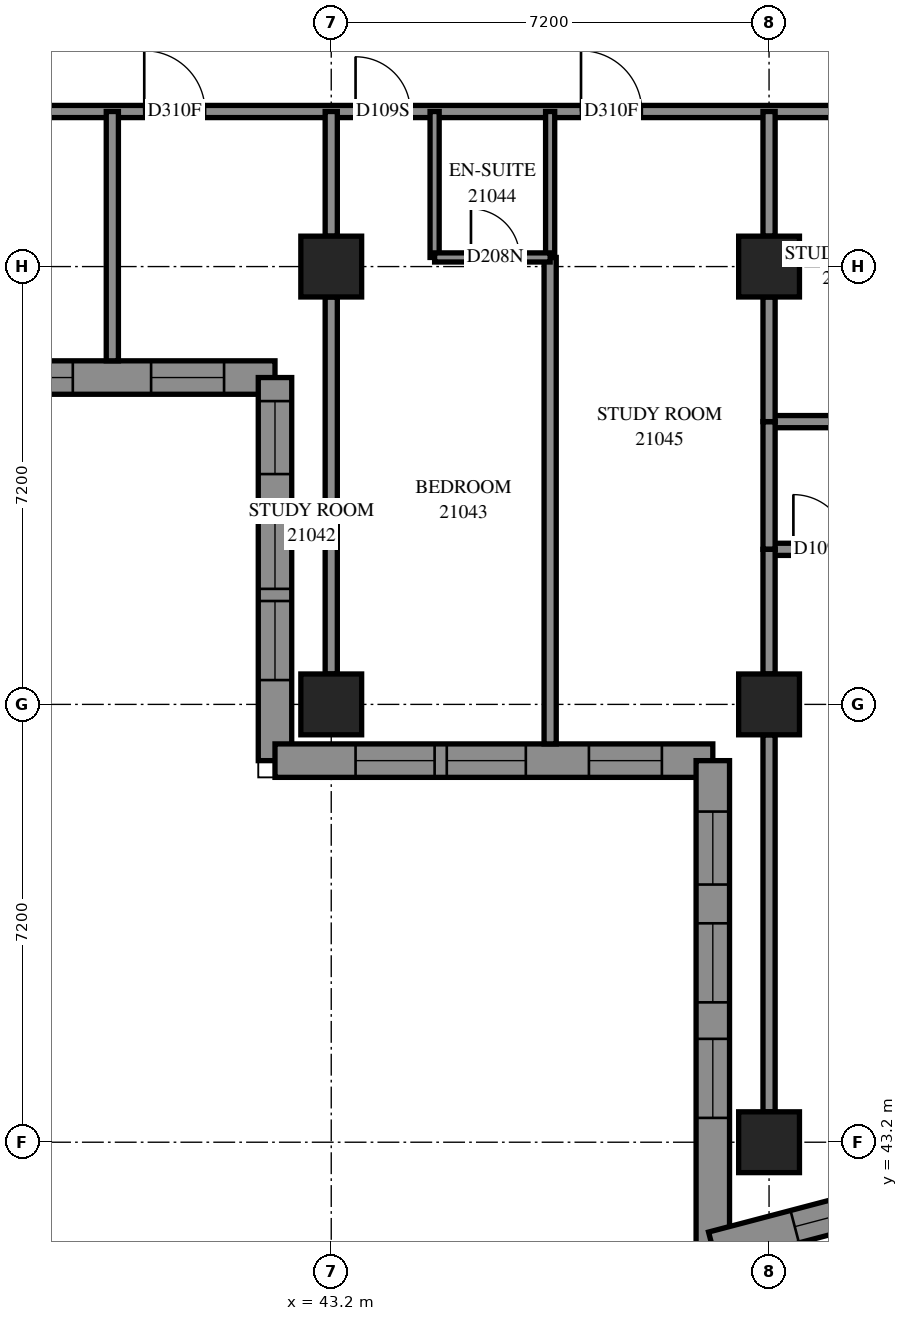
"""IFC4 building model, lengths in metres.
Left out: names, types, materials, properties, quantities, classifications, styles, units other than length and angle.
Written with IfcOpenShell. Run it as: python <this file> out.ifc"""

import sys

from ifc_helpers import new_model, si_unit, direction, frame, frame_2d, origin, origin_2d, place, context, subcontext, project, spatial, polyline, rectangle, outline, extrude, element, fill, save


model = new_model("IFC4")
c1 = context("Model", 3, precision=1e-05, world=origin(), true_north=direction((0.0, 1.0)))
c2 = subcontext(c1, "Body", "Model", "MODEL_VIEW")
j1 = project(units=[si_unit("LENGTHUNIT", "METRE"), si_unit("PLANEANGLEUNIT", "RADIAN")], contexts=[c1])
p1 = place(None, origin())
s1 = spatial("IfcSite", under=j1, at=p1, CompositionType="ELEMENT")
p2 = place(p1, origin())
s2 = spatial("IfcBuilding", under=s1, at=p2, CompositionType="ELEMENT")
p3 = place(p2, frame((0.0, 0.0, 81.2)))
s3 = spatial("IfcBuildingStorey", under=s2, at=p3, CompositionType="ELEMENT", Elevation=81.2)
for number, where, z_axis, x_axis in (
    (1, (43.2, 50.4, 0.0), (0.0, 0.0, 1.0), (1.0, 0.0, 0.0)),
    (2, (43.2, 57.6, 0.0), (0.0, 0.0, 1.0), (1.0, 0.0, 0.0)),
    (3, (50.4, 43.2, 0.0), (0.0, 0.0, 1.0), (1.0, 0.0, 0.0)),
    (4, (50.4, 50.4, 0.0), (0.0, 0.0, 1.0), (1.0, 0.0, 0.0)),
    (5, (50.4, 57.6, 0.0), (0.0, 0.0, 1.0), (1.0, 0.0, 0.0)),
):
    element("IfcColumn", number, at=place(p3, frame(where, z_axis=z_axis, x_axis=x_axis)), inside=s3, PredefinedType="COLUMN", context=c2, shape_type="SweptSolid", body=[
        extrude(rectangle(XDim=1.0, YDim=1.0, at=origin_2d()), origin(), (0.0, 0.0, 1.0), 3.1),
    ])
p4 = place(p3, frame((27.875, 55.775, 0.0), z_axis=(0.0, 0.0, 1.0), x_axis=(1.0, 0.0, 0.0)))
e6 = element("IfcWall", 6, at=p4, inside=s3, PredefinedType="SOLIDWALL", context=c2, shape_type="SweptSolid", body=[
    extrude(outline(polyline([(-0.275, -0.275), (14.125, -0.275), (14.675, 0.275), (0.275, 0.275), (-0.275, -0.275)])), origin(), (0.0, 0.0, 1.0), 3.1),
])
p5 = place(p4, frame((1.175, 0.0, 0.5)))
e7 = element("IfcOpeningElement", 7, at=p5, cuts=e6, PredefinedType="OPENING", context=c2, shape_type="SweptSolid", body=[
    extrude(rectangle(XDim=1.3, YDim=2.45, at=frame_2d((0.65, 1.225))), frame((0.0, 0.285, 0.0), z_axis=(0.0, -1.0, 0.0), x_axis=(1.0, 0.0, 0.0)), (0.0, 0.0, 1.0), 0.57),
])
p6 = place(p4, frame((2.675, 0.0, 0.5)))
e8 = element("IfcOpeningElement", 8, at=p6, cuts=e6, PredefinedType="OPENING", context=c2, shape_type="SweptSolid", body=[
    extrude(rectangle(XDim=1.3, YDim=2.45, at=frame_2d((0.65, 1.225))), frame((0.0, 0.285, 0.0), z_axis=(0.0, -1.0, 0.0), x_axis=(1.0, 0.0, 0.0)), (0.0, 0.0, 1.0), 0.57),
])
p7 = place(p4, frame((4.925, 0.0, 0.5)))
e9 = element("IfcOpeningElement", 9, at=p7, cuts=e6, PredefinedType="OPENING", context=c2, shape_type="SweptSolid", body=[
    extrude(rectangle(XDim=1.3, YDim=2.45, at=frame_2d((0.65, 1.225))), frame((0.0, 0.285, 0.0), z_axis=(0.0, -1.0, 0.0), x_axis=(1.0, 0.0, 0.0)), (0.0, 0.0, 1.0), 0.57),
])
p8 = place(p4, frame((6.425, 0.0, 0.5)))
e10 = element("IfcOpeningElement", 10, at=p8, cuts=e6, PredefinedType="OPENING", context=c2, shape_type="SweptSolid", body=[
    extrude(rectangle(XDim=1.3, YDim=2.45, at=frame_2d((0.65, 1.225))), frame((0.0, 0.285, 0.0), z_axis=(0.0, -1.0, 0.0), x_axis=(1.0, 0.0, 0.0)), (0.0, 0.0, 1.0), 0.57),
])
p9 = place(p4, frame((8.275, 0.0, 0.5)))
e11 = element("IfcOpeningElement", 11, at=p9, cuts=e6, PredefinedType="OPENING", context=c2, shape_type="SweptSolid", body=[
    extrude(rectangle(XDim=1.3, YDim=2.45, at=frame_2d((0.65, 1.225))), frame((0.0, 0.285, 0.0), z_axis=(0.0, -1.0, 0.0), x_axis=(1.0, 0.0, 0.0)), (0.0, 0.0, 1.0), 0.57),
])
p10 = place(p4, frame((9.775, 0.0, 0.5)))
e12 = element("IfcOpeningElement", 12, at=p10, cuts=e6, PredefinedType="OPENING", context=c2, shape_type="SweptSolid", body=[
    extrude(rectangle(XDim=1.3, YDim=2.45, at=frame_2d((0.65, 1.225))), frame((0.0, 0.285, 0.0), z_axis=(0.0, -1.0, 0.0), x_axis=(1.0, 0.0, 0.0)), (0.0, 0.0, 1.0), 0.57),
])
p11 = place(p4, frame((12.363, 0.0, 0.5)))
e13 = element("IfcOpeningElement", 13, at=p11, cuts=e6, PredefinedType="OPENING", context=c2, shape_type="SweptSolid", body=[
    extrude(rectangle(XDim=1.2, YDim=2.45, at=frame_2d((0.6, 1.225))), frame((0.0, 0.285, 0.0), z_axis=(0.0, -1.0, 0.0), x_axis=(1.0, 0.0, 0.0)), (0.0, 0.0, 1.0), 0.57),
])
p12 = place(p3, frame((42.275, 55.775, 0.0), z_axis=(0.0, 0.0, 1.0), x_axis=(0.0, -1.0, 0.0)))
e14 = element("IfcWall", 14, at=p12, inside=s3, PredefinedType="SOLIDWALL", context=c2, shape_type="SweptSolid", body=[
    extrude(outline(polyline([(0.275, -0.275), (6.575, -0.275), (6.025, 0.275), (-0.275, 0.275), (0.275, -0.275)])), origin(), (0.0, 0.0, 1.0), 3.1),
])
p13 = place(p12, frame((2.175, 0.0, 0.5)))
e15 = element("IfcOpeningElement", 15, at=p13, cuts=e14, PredefinedType="OPENING", context=c2, shape_type="SweptSolid", body=[
    extrude(rectangle(XDim=1.3, YDim=2.45, at=frame_2d((0.65, 1.225))), frame((0.0, 0.285, 0.0), z_axis=(0.0, -1.0, 0.0), x_axis=(1.0, 0.0, 0.0)), (0.0, 0.0, 1.0), 0.57),
])
p14 = place(p12, frame((3.675, 0.0, 0.5)))
e16 = element("IfcOpeningElement", 16, at=p14, cuts=e14, PredefinedType="OPENING", context=c2, shape_type="SweptSolid", body=[
    extrude(rectangle(XDim=1.3, YDim=2.45, at=frame_2d((0.65, 1.225))), frame((0.0, 0.285, 0.0), z_axis=(0.0, -1.0, 0.0), x_axis=(1.0, 0.0, 0.0)), (0.0, 0.0, 1.0), 0.57),
])
p15 = place(p12, frame((0.388, 0.0, 0.5)))
e17 = element("IfcOpeningElement", 17, at=p15, cuts=e14, PredefinedType="OPENING", context=c2, shape_type="SweptSolid", body=[
    extrude(rectangle(XDim=1.2, YDim=2.45, at=frame_2d((0.6, 1.225))), frame((0.0, 0.285, 0.0), z_axis=(0.0, -1.0, 0.0), x_axis=(1.0, 0.0, 0.0)), (0.0, 0.0, 1.0), 0.57),
])
p16 = place(p3, frame((42.275, 49.475, 0.0), z_axis=(0.0, 0.0, 1.0), x_axis=(1.0, 0.0, 0.0)))
e18 = element("IfcWall", 18, at=p16, inside=s3, PredefinedType="SOLIDWALL", context=c2, shape_type="SweptSolid", body=[
    extrude(outline(polyline([(-0.275, -0.275), (6.925, -0.275), (7.475, 0.275), (0.275, 0.275), (-0.275, -0.275)])), origin(), (0.0, 0.0, 1.0), 3.1),
])
p17 = place(p16, frame((1.325, 0.0, 0.5)))
e19 = element("IfcOpeningElement", 19, at=p17, cuts=e18, PredefinedType="OPENING", context=c2, shape_type="SweptSolid", body=[
    extrude(rectangle(XDim=1.3, YDim=2.45, at=frame_2d((0.65, 1.225))), frame((0.0, 0.285, 0.0), z_axis=(0.0, -1.0, 0.0), x_axis=(1.0, 0.0, 0.0)), (0.0, 0.0, 1.0), 0.57),
])
p18 = place(p16, frame((2.825, 0.0, 0.5)))
e20 = element("IfcOpeningElement", 20, at=p18, cuts=e18, PredefinedType="OPENING", context=c2, shape_type="SweptSolid", body=[
    extrude(rectangle(XDim=1.3, YDim=2.45, at=frame_2d((0.65, 1.225))), frame((0.0, 0.285, 0.0), z_axis=(0.0, -1.0, 0.0), x_axis=(1.0, 0.0, 0.0)), (0.0, 0.0, 1.0), 0.57),
])
p19 = place(p16, frame((5.162, 0.0, 0.5)))
e21 = element("IfcOpeningElement", 21, at=p19, cuts=e18, PredefinedType="OPENING", context=c2, shape_type="SweptSolid", body=[
    extrude(rectangle(XDim=1.2, YDim=2.45, at=frame_2d((0.6, 1.225))), frame((0.0, 0.285, 0.0), z_axis=(0.0, -1.0, 0.0), x_axis=(1.0, 0.0, 0.0)), (0.0, 0.0, 1.0), 0.57),
])
p20 = place(p3, frame((49.475, 49.475, 0.0), z_axis=(0.0, 0.0, 1.0), x_axis=(0.0, -1.0, 0.0)))
e22 = element("IfcWall", 22, at=p20, inside=s3, PredefinedType="SOLIDWALL", context=c2, shape_type="SweptSolid", body=[
    extrude(outline(polyline([(0.275, -0.275), (8.375, -0.275), (7.662, 0.275), (-0.275, 0.275), (0.275, -0.275)])), origin(), (0.0, 0.0, 1.0), 3.1),
])
p21 = place(p20, frame((2.675, 0.0, 0.5)))
e23 = element("IfcOpeningElement", 23, at=p21, cuts=e22, PredefinedType="OPENING", context=c2, shape_type="SweptSolid", body=[
    extrude(rectangle(XDim=1.3, YDim=2.45, at=frame_2d((0.65, 1.225))), frame((0.0, 0.285, 0.0), z_axis=(0.0, -1.0, 0.0), x_axis=(1.0, 0.0, 0.0)), (0.0, 0.0, 1.0), 0.57),
])
p22 = place(p20, frame((4.575, 0.0, 0.5)))
e24 = element("IfcOpeningElement", 24, at=p22, cuts=e22, PredefinedType="OPENING", context=c2, shape_type="SweptSolid", body=[
    extrude(rectangle(XDim=1.3, YDim=2.45, at=frame_2d((0.65, 1.225))), frame((0.0, 0.285, 0.0), z_axis=(0.0, -1.0, 0.0), x_axis=(1.0, 0.0, 0.0)), (0.0, 0.0, 1.0), 0.57),
])
p23 = place(p20, frame((0.838, 0.0, 0.5)))
e25 = element("IfcOpeningElement", 25, at=p23, cuts=e22, PredefinedType="OPENING", context=c2, shape_type="SweptSolid", body=[
    extrude(rectangle(XDim=1.2, YDim=2.45, at=frame_2d((0.6, 1.225))), frame((0.0, 0.285, 0.0), z_axis=(0.0, -1.0, 0.0), x_axis=(1.0, 0.0, 0.0)), (0.0, 0.0, 1.0), 0.57),
])
p24 = place(p3, frame((49.475, 41.457, 0.0), z_axis=(0.0, 0.0, 1.0), x_axis=(0.9671322544, 0.2542738729, 0.0)))
e26 = element("IfcWall", 26, at=p24, inside=s3, PredefinedType="SOLIDWALL", context=c2, shape_type="SweptSolid", body=[
    extrude(outline(polyline([(-0.357, -0.275), (3.183, -0.275), (3.278, 0.275), (0.357, 0.275), (-0.357, -0.275)])), origin(), (0.0, 0.0, 1.0), 3.1),
])
p25 = place(p24, frame((1.393, 0.0, 0.5)))
e27 = element("IfcOpeningElement", 27, at=p25, cuts=e26, PredefinedType="OPENING", context=c2, shape_type="SweptSolid", body=[
    extrude(rectangle(XDim=1.2, YDim=2.45, at=frame_2d((0.6, 1.225))), frame((0.0, 0.285, 0.0), z_axis=(0.0, -1.0, 0.0), x_axis=(1.0, 0.0, 0.0)), (0.0, 0.0, 1.0), 0.57),
])
p26 = place(p3, frame((28.8, 60.15, 0.0), z_axis=(0.0, 0.0, 1.0), x_axis=(1.0, 0.0, 0.0)))
e28 = element("IfcWall", 28, at=p26, inside=s3, PredefinedType="PARTITIONING", context=c2, shape_type="SweptSolid", body=[
    extrude(rectangle(XDim=24.15, YDim=0.2, at=frame_2d((12.075, 0.0))), origin(), (0.0, 0.0, 1.0), 3.1),
])
p27 = place(p26, frame((11.325, 0.0, 0.0)))
e29 = element("IfcOpeningElement", 29, at=p27, cuts=e28, PredefinedType="OPENING", context=c2, shape_type="SweptSolid", body=[
    extrude(rectangle(XDim=1.0, YDim=2.1, at=frame_2d((0.5, 1.05))), frame((0.0, 0.11, 0.0), z_axis=(0.0, -1.0, 0.0), x_axis=(1.0, 0.0, 0.0)), (0.0, 0.0, 1.0), 0.22),
])
p28 = place(p26, frame((14.8, 0.0, 0.0)))
e30 = element("IfcOpeningElement", 30, at=p28, cuts=e28, PredefinedType="OPENING", context=c2, shape_type="SweptSolid", body=[
    extrude(rectangle(XDim=0.9, YDim=2.1, at=frame_2d((0.45, 1.05))), frame((0.0, 0.11, 0.0), z_axis=(0.0, -1.0, 0.0), x_axis=(1.0, 0.0, 0.0)), (0.0, 0.0, 1.0), 0.22),
])
p29 = place(p26, frame((18.508, 0.0, 0.0)))
e31 = element("IfcOpeningElement", 31, at=p29, cuts=e28, PredefinedType="OPENING", context=c2, shape_type="SweptSolid", body=[
    extrude(rectangle(XDim=1.0, YDim=2.1, at=frame_2d((0.5, 1.05))), frame((0.0, 0.11, 0.0), z_axis=(0.0, -1.0, 0.0), x_axis=(1.0, 0.0, 0.0)), (0.0, 0.0, 1.0), 0.22),
])
p30 = place(p26, frame((22.882, 0.0, 0.0)))
e32 = element("IfcOpeningElement", 32, at=p30, cuts=e28, PredefinedType="OPENING", context=c2, shape_type="SweptSolid", body=[
    extrude(rectangle(XDim=1.0, YDim=2.1, at=frame_2d((0.5, 1.05))), frame((0.0, 0.11, 0.0), z_axis=(0.0, -1.0, 0.0), x_axis=(1.0, 0.0, 0.0)), (0.0, 0.0, 1.0), 0.22),
])
p31 = place(p3, frame((46.8, 49.75, 0.0), z_axis=(0.0, 0.0, 1.0), x_axis=(0.0, 1.0, 0.0)))
e33 = element("IfcWall", 33, at=p31, inside=s3, PredefinedType="PARTITIONING", context=c2, shape_type="SweptSolid", body=[
    extrude(rectangle(XDim=8.0, YDim=0.2, at=frame_2d((4.0, 0.0))), origin(), (0.0, 0.0, 1.0), 3.1),
])
for number, where, z_axis, x_axis in (
    (34, (43.2, 50.9, 0.0), (0.0, 0.0, 1.0), (0.0, 1.0, 0.0)),
    (35, (50.4, 43.7, 0.0), (0.0, 0.0, 1.0), (0.0, 1.0, 0.0)),
):
    element("IfcWall", number, at=place(p3, frame(where, z_axis=z_axis, x_axis=x_axis)), inside=s3, PredefinedType="PARTITIONING", context=c2, shape_type="SweptSolid", body=[
        extrude(rectangle(XDim=6.2, YDim=0.2, at=frame_2d((3.1, 0.0))), origin(), (0.0, 0.0, 1.0), 2.6),
    ])
p32 = place(p3, frame((50.4, 52.95, 0.0), z_axis=(0.0, 0.0, 1.0), x_axis=(1.0, 0.0, 0.0)))
e36 = element("IfcWall", 36, at=p32, inside=s3, PredefinedType="PARTITIONING", context=c2, shape_type="SweptSolid", body=[
    extrude(rectangle(XDim=4.9, YDim=0.2, at=frame_2d((2.45, 0.0))), origin(), (0.0, 0.0, 1.0), 3.1),
])
p33 = place(p32, frame((0.4, 0.0, 0.0)))
e37 = element("IfcOpeningElement", 37, at=p33, cuts=e36, PredefinedType="OPENING", context=c2, shape_type="SweptSolid", body=[
    extrude(rectangle(XDim=0.9, YDim=2.1, at=frame_2d((0.45, 1.05))), frame((0.0, 0.11, 0.0), z_axis=(0.0, -1.0, 0.0), x_axis=(1.0, 0.0, 0.0)), (0.0, 0.0, 1.0), 0.22),
])
p34 = place(p3, frame((39.6, 56.05, 0.0), z_axis=(0.0, 0.0, 1.0), x_axis=(0.0, 1.0, 0.0)))
e38 = element("IfcWall", 38, at=p34, inside=s3, PredefinedType="PARTITIONING", context=c2, shape_type="SweptSolid", body=[
    extrude(rectangle(XDim=4.1, YDim=0.2, at=frame_2d((2.05, 0.0))), origin(), (0.0, 0.0, 1.0), 3.1),
])
p35 = place(p3, frame((50.4, 55.05, 0.0), z_axis=(0.0, 0.0, 1.0), x_axis=(1.0, 0.0, 0.0)))
e39 = element("IfcWall", 39, at=p35, inside=s3, PredefinedType="PARTITIONING", context=c2, shape_type="SweptSolid", body=[
    extrude(rectangle(XDim=2.55, YDim=0.2, at=frame_2d((1.275, 0.0))), origin(), (0.0, 0.0, 1.0), 3.1),
])
for number, where, z_axis, x_axis in (
    (40, (44.9, 57.75, 0.0), (0.0, 0.0, 1.0), (0.0, 1.0, 0.0)),
    (41, (46.8, 57.75, 0.0), (0.0, 0.0, 1.0), (0.0, 1.0, 0.0)),
):
    element("IfcWall", number, at=place(p3, frame(where, z_axis=z_axis, x_axis=x_axis)), inside=s3, PredefinedType="PARTITIONING", context=c2, shape_type="SweptSolid", body=[
        extrude(rectangle(XDim=2.4, YDim=0.15, at=frame_2d((1.2, 0.0))), origin(), (0.0, 0.0, 1.0), 3.1),
    ])
p36 = place(p3, frame((50.4, 52.95, 0.0), z_axis=(0.0, 0.0, 1.0), x_axis=(0.0, 1.0, 0.0)))
e42 = element("IfcWall", 42, at=p36, inside=s3, PredefinedType="PARTITIONING", context=c2, shape_type="SweptSolid", body=[
    extrude(rectangle(XDim=2.1, YDim=0.2, at=frame_2d((1.05, 0.0))), origin(), (0.0, 0.0, 1.0), 3.1),
])
for number, where, z_axis, x_axis in (
    (43, (50.4, 50.9, 0.0), (0.0, 0.0, 1.0), (0.0, 1.0, 0.0)),
    (44, (50.4, 55.05, 0.0), (0.0, 0.0, 1.0), (0.0, 1.0, 0.0)),
    (45, (43.2, 58.1, 0.0), (0.0, 0.0, 1.0), (0.0, 1.0, 0.0)),
    (46, (50.4, 58.1, 0.0), (0.0, 0.0, 1.0), (0.0, 1.0, 0.0)),
):
    element("IfcWall", number, at=place(p3, frame(where, z_axis=z_axis, x_axis=x_axis)), inside=s3, PredefinedType="PARTITIONING", context=c2, shape_type="SweptSolid", body=[
        extrude(rectangle(XDim=2.05, YDim=0.2, at=frame_2d((1.025, 0.0))), origin(), (0.0, 0.0, 1.0), 3.1),
    ])
p37 = place(p3, frame((44.9, 57.75, 0.0), z_axis=(0.0, 0.0, 1.0), x_axis=(1.0, 0.0, 0.0)))
e47 = element("IfcWall", 47, at=p37, inside=s3, PredefinedType="PARTITIONING", context=c2, shape_type="SweptSolid", body=[
    extrude(rectangle(XDim=1.9, YDim=0.15, at=frame_2d((0.95, 0.0))), origin(), (0.0, 0.0, 1.0), 3.1),
])
p38 = place(p37, frame((0.598, 0.0, 0.0)))
e48 = element("IfcOpeningElement", 48, at=p38, cuts=e47, PredefinedType="OPENING", context=c2, shape_type="SweptSolid", body=[
    extrude(rectangle(XDim=0.8, YDim=2.1, at=frame_2d((0.4, 1.05))), frame((0.0, 0.085, 0.0), z_axis=(0.0, -1.0, 0.0), x_axis=(1.0, 0.0, 0.0)), (0.0, 0.0, 1.0), 0.17),
])
p39 = place(p10, origin())
e49 = element("IfcWindow", 49, at=p39, inside=s3, PartitioningType="SINGLE_PANEL", PredefinedType="WINDOW", context=c2, shape_type="SweptSolid", body=[
    extrude(rectangle(XDim=1.3, YDim=2.45, at=frame_2d((0.65, 1.225))), frame((0.0, 0.155, 0.0), z_axis=(0.0, -1.0, 0.0), x_axis=(1.0, 0.0, 0.0)), (0.0, 0.0, 1.0), 0.06),
])
fill(e12, e49)
p40 = place(p11, origin())
e50 = element("IfcWindow", 50, at=p40, inside=s3, PartitioningType="SINGLE_PANEL", PredefinedType="WINDOW", context=c2, shape_type="SweptSolid", body=[
    extrude(rectangle(XDim=1.2, YDim=2.45, at=frame_2d((0.6, 1.225))), frame((0.0, 0.155, 0.0), z_axis=(0.0, -1.0, 0.0), x_axis=(1.0, 0.0, 0.0)), (0.0, 0.0, 1.0), 0.06),
])
fill(e13, e50)
p41 = place(p13, origin())
e51 = element("IfcWindow", 51, at=p41, inside=s3, PartitioningType="SINGLE_PANEL", PredefinedType="WINDOW", context=c2, shape_type="SweptSolid", body=[
    extrude(rectangle(XDim=1.3, YDim=2.45, at=frame_2d((0.65, 1.225))), frame((0.0, 0.155, 0.0), z_axis=(0.0, -1.0, 0.0), x_axis=(1.0, 0.0, 0.0)), (0.0, 0.0, 1.0), 0.06),
])
fill(e15, e51)
p42 = place(p14, origin())
e52 = element("IfcWindow", 52, at=p42, inside=s3, PartitioningType="SINGLE_PANEL", PredefinedType="WINDOW", context=c2, shape_type="SweptSolid", body=[
    extrude(rectangle(XDim=1.3, YDim=2.45, at=frame_2d((0.65, 1.225))), frame((0.0, 0.155, 0.0), z_axis=(0.0, -1.0, 0.0), x_axis=(1.0, 0.0, 0.0)), (0.0, 0.0, 1.0), 0.06),
])
fill(e16, e52)
p43 = place(p15, origin())
e53 = element("IfcWindow", 53, at=p43, inside=s3, PartitioningType="SINGLE_PANEL", PredefinedType="WINDOW", context=c2, shape_type="SweptSolid", body=[
    extrude(rectangle(XDim=1.2, YDim=2.45, at=frame_2d((0.6, 1.225))), frame((0.0, 0.155, 0.0), z_axis=(0.0, -1.0, 0.0), x_axis=(1.0, 0.0, 0.0)), (0.0, 0.0, 1.0), 0.06),
])
fill(e17, e53)
p44 = place(p17, origin())
e54 = element("IfcWindow", 54, at=p44, inside=s3, PartitioningType="SINGLE_PANEL", PredefinedType="WINDOW", context=c2, shape_type="SweptSolid", body=[
    extrude(rectangle(XDim=1.3, YDim=2.45, at=frame_2d((0.65, 1.225))), frame((0.0, 0.155, 0.0), z_axis=(0.0, -1.0, 0.0), x_axis=(1.0, 0.0, 0.0)), (0.0, 0.0, 1.0), 0.06),
])
fill(e19, e54)
p45 = place(p18, origin())
e55 = element("IfcWindow", 55, at=p45, inside=s3, PartitioningType="SINGLE_PANEL", PredefinedType="WINDOW", context=c2, shape_type="SweptSolid", body=[
    extrude(rectangle(XDim=1.3, YDim=2.45, at=frame_2d((0.65, 1.225))), frame((0.0, 0.155, 0.0), z_axis=(0.0, -1.0, 0.0), x_axis=(1.0, 0.0, 0.0)), (0.0, 0.0, 1.0), 0.06),
])
fill(e20, e55)
p46 = place(p19, origin())
e56 = element("IfcWindow", 56, at=p46, inside=s3, PartitioningType="SINGLE_PANEL", PredefinedType="WINDOW", context=c2, shape_type="SweptSolid", body=[
    extrude(rectangle(XDim=1.2, YDim=2.45, at=frame_2d((0.6, 1.225))), frame((0.0, 0.155, 0.0), z_axis=(0.0, -1.0, 0.0), x_axis=(1.0, 0.0, 0.0)), (0.0, 0.0, 1.0), 0.06),
])
fill(e21, e56)
p47 = place(p21, origin())
e57 = element("IfcWindow", 57, at=p47, inside=s3, PartitioningType="SINGLE_PANEL", PredefinedType="WINDOW", context=c2, shape_type="SweptSolid", body=[
    extrude(rectangle(XDim=1.3, YDim=2.45, at=frame_2d((0.65, 1.225))), frame((0.0, 0.155, 0.0), z_axis=(0.0, -1.0, 0.0), x_axis=(1.0, 0.0, 0.0)), (0.0, 0.0, 1.0), 0.06),
])
fill(e23, e57)
p48 = place(p22, origin())
e58 = element("IfcWindow", 58, at=p48, inside=s3, PartitioningType="SINGLE_PANEL", PredefinedType="WINDOW", context=c2, shape_type="SweptSolid", body=[
    extrude(rectangle(XDim=1.3, YDim=2.45, at=frame_2d((0.65, 1.225))), frame((0.0, 0.155, 0.0), z_axis=(0.0, -1.0, 0.0), x_axis=(1.0, 0.0, 0.0)), (0.0, 0.0, 1.0), 0.06),
])
fill(e24, e58)
p49 = place(p23, origin())
e59 = element("IfcWindow", 59, at=p49, inside=s3, PartitioningType="SINGLE_PANEL", PredefinedType="WINDOW", context=c2, shape_type="SweptSolid", body=[
    extrude(rectangle(XDim=1.2, YDim=2.45, at=frame_2d((0.6, 1.225))), frame((0.0, 0.155, 0.0), z_axis=(0.0, -1.0, 0.0), x_axis=(1.0, 0.0, 0.0)), (0.0, 0.0, 1.0), 0.06),
])
fill(e25, e59)
p50 = place(p25, origin())
e60 = element("IfcWindow", 60, at=p50, inside=s3, PartitioningType="SINGLE_PANEL", PredefinedType="WINDOW", context=c2, shape_type="SweptSolid", body=[
    extrude(rectangle(XDim=1.2, YDim=2.45, at=frame_2d((0.6, 1.225))), frame((0.0, 0.155, 0.0), z_axis=(0.0, -1.0, 0.0), x_axis=(1.0, 0.0, 0.0)), (0.0, 0.0, 1.0), 0.06),
])
fill(e27, e60)
p51 = place(p27, origin())
e61 = element("IfcDoor", 61, at=p51, inside=s3, OperationType="SINGLE_SWING_RIGHT", PredefinedType="DOOR", context=c2, shape_type="SweptSolid", body=[
    extrude(rectangle(XDim=1.0, YDim=2.1, at=frame_2d((0.5, 1.05))), frame((0.0, 0.025, 0.0), z_axis=(0.0, -1.0, 0.0), x_axis=(1.0, 0.0, 0.0)), (0.0, 0.0, 1.0), 0.05),
])
fill(e29, e61)
p52 = place(p28, origin())
e62 = element("IfcDoor", 62, at=p52, inside=s3, OperationType="SINGLE_SWING_LEFT", PredefinedType="DOOR", context=c2, shape_type="SweptSolid", body=[
    extrude(rectangle(XDim=0.9, YDim=2.1, at=frame_2d((0.45, 1.05))), frame((0.0, 0.025, 0.0), z_axis=(0.0, -1.0, 0.0), x_axis=(1.0, 0.0, 0.0)), (0.0, 0.0, 1.0), 0.05),
])
fill(e30, e62)
p53 = place(p38, origin())
e63 = element("IfcDoor", 63, at=p53, inside=s3, OperationType="SINGLE_SWING_RIGHT", PredefinedType="DOOR", context=c2, shape_type="SweptSolid", body=[
    extrude(rectangle(XDim=0.8, YDim=2.1, at=frame_2d((0.4, 1.05))), frame((0.0, 0.025, 0.0), z_axis=(0.0, -1.0, 0.0), x_axis=(1.0, 0.0, 0.0)), (0.0, 0.0, 1.0), 0.05),
])
fill(e48, e63)
p54 = place(p29, origin())
e64 = element("IfcDoor", 64, at=p54, inside=s3, OperationType="SINGLE_SWING_RIGHT", PredefinedType="DOOR", context=c2, shape_type="SweptSolid", body=[
    extrude(rectangle(XDim=1.0, YDim=2.1, at=frame_2d((0.5, 1.05))), frame((0.0, 0.025, 0.0), z_axis=(0.0, -1.0, 0.0), x_axis=(1.0, 0.0, 0.0)), (0.0, 0.0, 1.0), 0.05),
])
fill(e31, e64)
p55 = place(p33, origin())
e65 = element("IfcDoor", 65, at=p55, inside=s3, OperationType="SINGLE_SWING_LEFT", PredefinedType="DOOR", context=c2, shape_type="SweptSolid", body=[
    extrude(rectangle(XDim=0.9, YDim=2.1, at=frame_2d((0.45, 1.05))), frame((0.0, 0.025, 0.0), z_axis=(0.0, -1.0, 0.0), x_axis=(1.0, 0.0, 0.0)), (0.0, 0.0, 1.0), 0.05),
])
fill(e37, e65)
save(model, sys.argv[1])
